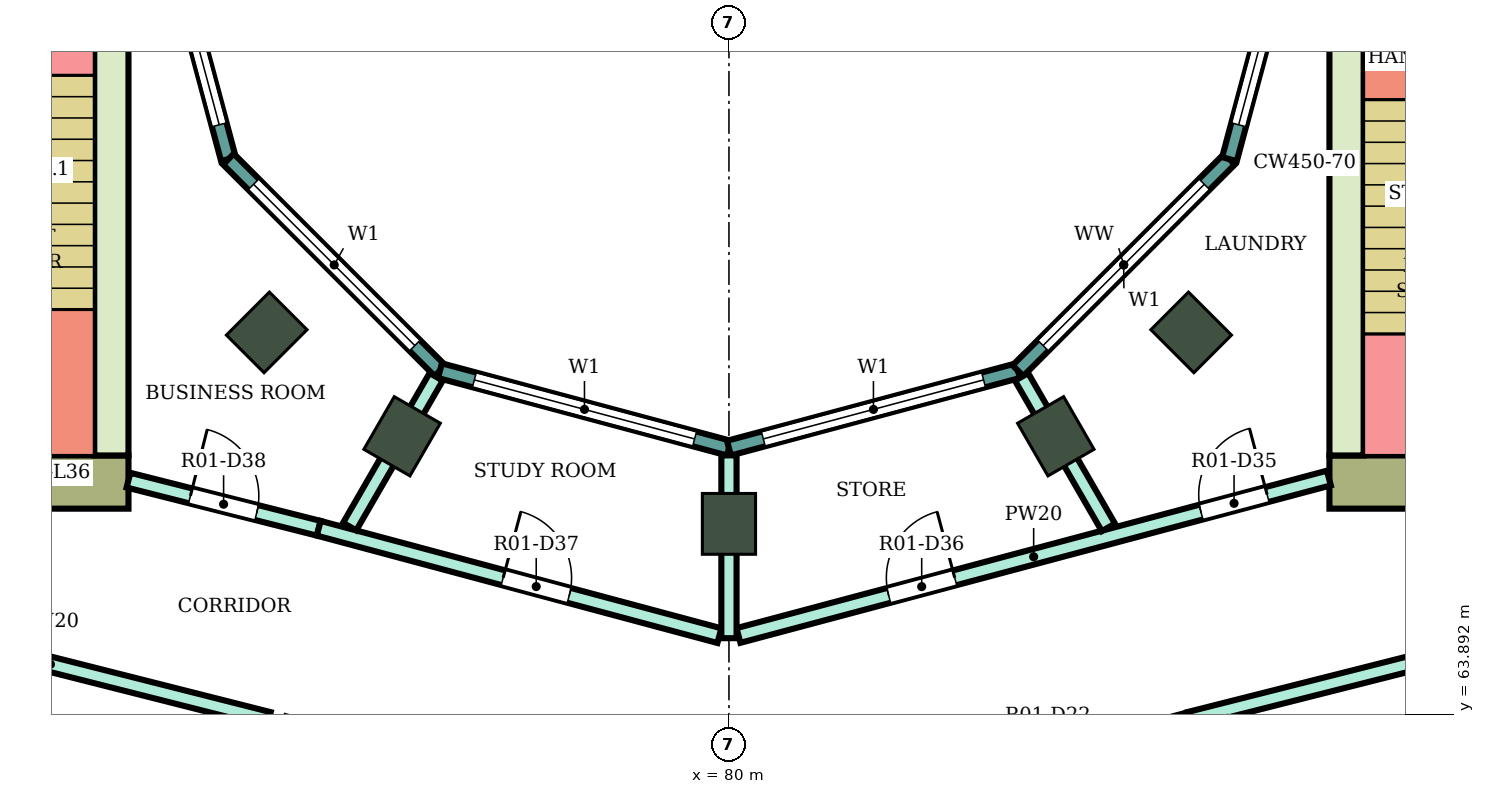
"""IFC4 building model, lengths in metres.
Left out: names, types, materials, properties, quantities, classifications, styles, units other than length and angle.
Written with IfcOpenShell. Run it as: python <this file> out.ifc"""

import sys

from ifc_helpers import new_model, si_unit, direction, frame, frame_2d, origin, origin_2d, place, context, subcontext, project, spatial, rectangle, extrude, element, fill, save


model = new_model("IFC4")
c1 = context("Model", 3, precision=1e-05, world=origin(), true_north=direction((0.0, 1.0)))
c2 = subcontext(c1, "Body", "Model", "MODEL_VIEW")
j1 = project(units=[si_unit("LENGTHUNIT", "METRE"), si_unit("PLANEANGLEUNIT", "RADIAN")], contexts=[c1])
p1 = place(None, origin())
s1 = spatial("IfcSite", under=j1, at=p1, CompositionType="ELEMENT")
p2 = place(p1, origin())
s2 = spatial("IfcBuilding", under=s1, at=p2, CompositionType="ELEMENT")
p3 = place(p2, frame((0.0, 0.0, 157.7)))
s3 = spatial("IfcBuildingStorey", under=s2, at=p3, CompositionType="ELEMENT", Elevation=157.7)
for number, where, z_axis, x_axis in (
    (1, (73.919, 68.919, 0.0), (0.0, 0.0, 1.0), (-0.707, -0.707, 0.0)),
    (2, (75.7, 67.552, 0.0), (0.0, 0.0, 1.0), (-0.5, -0.866, 0.0)),
    (3, (80.0, 66.4, 0.0), (0.0, 0.0, 1.0), (0.0, -1.0, 0.0)),
    (4, (84.3, 67.552, 0.0), (0.0, 0.0, 1.0), (0.5, -0.866, 0.0)),
    (5, (86.081, 68.919, 0.0), (0.0, 0.0, 1.0), (0.707, -0.707, 0.0)),
):
    element("IfcColumn", number, at=place(p3, frame(where, z_axis=z_axis, x_axis=x_axis)), inside=s3, PredefinedType="COLUMN", context=c2, shape_type="SweptSolid", body=[
        extrude(rectangle(XDim=0.8, YDim=0.7, at=origin_2d()), origin(), (0.0, 0.0, 1.0), 4.1),
    ])
p4 = place(p3, frame((87.9, 66.95, 0.0), z_axis=(0.0, 0.0, 1.0), x_axis=(1.0, 0.0, 0.0)))
e6 = element("IfcWall", 6, at=p4, inside=s3, PredefinedType="SHEAR", context=c2, shape_type="SweptSolid", body=[
    extrude(rectangle(XDim=14.8, YDim=0.7, at=frame_2d((7.4, 0.0))), origin(), (0.0, 0.0, 1.0), 3.78),
])
p5 = place(p4, frame((4.2, 0.0, 0.0)))
e7 = element("IfcOpeningElement", 7, at=p5, cuts=e6, PredefinedType="OPENING", context=c2, shape_type="SweptSolid", body=[
    extrude(rectangle(XDim=2.4, YDim=2.4, at=frame_2d((1.2, 1.2))), frame((0.0, 0.36, 0.0), z_axis=(0.0, -1.0, 0.0), x_axis=(1.0, 0.0, 0.0)), (0.0, 0.0, 1.0), 0.72),
])
p6 = place(p3, frame((88.125, 67.3, 0.0), z_axis=(0.0, 0.0, 1.0), x_axis=(0.0, 1.0, 0.0)))
e8 = element("IfcWall", 8, at=p6, inside=s3, PredefinedType="SHEAR", context=c2, shape_type="SweptSolid", body=[
    extrude(rectangle(XDim=7.7, YDim=0.45, at=frame_2d((3.85, 0.0))), origin(), (0.0, 0.0, 1.0), 3.78),
])
p7 = place(p3, frame((72.1, 66.95, 0.0), z_axis=(0.0, 0.0, 1.0), x_axis=(-1.0, 0.0, 0.0)))
e9 = element("IfcWall", 9, at=p7, inside=s3, PredefinedType="SHEAR", context=c2, shape_type="SweptSolid", body=[
    extrude(rectangle(XDim=14.8, YDim=0.7, at=frame_2d((7.4, 0.0))), origin(), (0.0, 0.0, 1.0), 3.78),
])
p8 = place(p7, frame((4.2, 0.0, 0.0)))
e10 = element("IfcOpeningElement", 10, at=p8, cuts=e9, PredefinedType="OPENING", context=c2, shape_type="SweptSolid", body=[
    extrude(rectangle(XDim=2.4, YDim=2.4, at=frame_2d((1.2, 1.2))), frame((0.0, 0.36, 0.0), z_axis=(0.0, -1.0, 0.0), x_axis=(1.0, 0.0, 0.0)), (0.0, 0.0, 1.0), 0.72),
])
p9 = place(p3, frame((71.875, 75.0, 0.0), z_axis=(0.0, 0.0, 1.0), x_axis=(0.0, -1.0, 0.0)))
e11 = element("IfcWall", 11, at=p9, inside=s3, PredefinedType="SHEAR", context=c2, shape_type="SweptSolid", body=[
    extrude(rectangle(XDim=7.7, YDim=0.45, at=frame_2d((3.85, 0.0))), origin(), (0.0, 0.0, 1.0), 3.78),
])
p10 = place(p3, frame((72.396, 75.0, 0.0), z_axis=(0.0, 0.0, 1.0), x_axis=(0.258789828301, -0.965933654434, 0.0)))
e12 = element("IfcWall", 12, at=p10, inside=s3, PredefinedType="NOTDEFINED", context=c2, shape_type="SweptSolid", body=[
    extrude(rectangle(XDim=3.936, YDim=0.2, at=frame_2d((1.968, 0.0))), origin(), (0.0, 0.0, 1.0), 4.1),
])
p11 = place(p10, frame((0.468, 0.0, 0.9)))
e13 = element("IfcOpeningElement", 13, at=p11, cuts=e12, PredefinedType="OPENING", context=c2, shape_type="SweptSolid", body=[
    extrude(rectangle(XDim=3.0, YDim=2.3, at=frame_2d((1.5, 1.15))), frame((0.0, 0.11, 0.0), z_axis=(0.0, -1.0, 0.0), x_axis=(1.0, 0.0, 0.0)), (0.0, 0.0, 1.0), 0.22),
])
p12 = place(p3, frame((73.415, 71.198, 0.0), z_axis=(0.0, 0.0, 1.0), x_axis=(0.707106781187, -0.707106781187, 0.0)))
e14 = element("IfcWall", 14, at=p12, inside=s3, PredefinedType="NOTDEFINED", context=c2, shape_type="SweptSolid", body=[
    extrude(rectangle(XDim=3.936, YDim=0.2, at=frame_2d((1.968, 0.0))), origin(), (0.0, 0.0, 1.0), 4.1),
])
p13 = place(p12, frame((0.468, 0.0, 0.9)))
e15 = element("IfcOpeningElement", 15, at=p13, cuts=e14, PredefinedType="OPENING", context=c2, shape_type="SweptSolid", body=[
    extrude(rectangle(XDim=3.0, YDim=2.3, at=frame_2d((1.5, 1.15))), frame((0.0, 0.11, 0.0), z_axis=(0.0, -1.0, 0.0), x_axis=(1.0, 0.0, 0.0)), (0.0, 0.0, 1.0), 0.22),
])
p14 = place(p3, frame((76.198, 68.415, 0.0), z_axis=(0.0, 0.0, 1.0), x_axis=(0.965933654434, -0.258789828301, 0.0)))
e16 = element("IfcWall", 16, at=p14, inside=s3, PredefinedType="NOTDEFINED", context=c2, shape_type="SweptSolid", body=[
    extrude(rectangle(XDim=3.936, YDim=0.2, at=frame_2d((1.968, 0.0))), origin(), (0.0, 0.0, 1.0), 4.1),
])
p15 = place(p14, frame((0.468, 0.0, 0.9)))
e17 = element("IfcOpeningElement", 17, at=p15, cuts=e16, PredefinedType="OPENING", context=c2, shape_type="SweptSolid", body=[
    extrude(rectangle(XDim=3.0, YDim=2.3, at=frame_2d((1.5, 1.15))), frame((0.0, 0.11, 0.0), z_axis=(0.0, -1.0, 0.0), x_axis=(1.0, 0.0, 0.0)), (0.0, 0.0, 1.0), 0.22),
])
p16 = place(p3, frame((80.0, 67.396, 0.0), z_axis=(0.0, 0.0, 1.0), x_axis=(0.965933654434, 0.258789828301, 0.0)))
e18 = element("IfcWall", 18, at=p16, inside=s3, PredefinedType="NOTDEFINED", context=c2, shape_type="SweptSolid", body=[
    extrude(rectangle(XDim=3.936, YDim=0.2, at=frame_2d((1.968, 0.0))), origin(), (0.0, 0.0, 1.0), 4.1),
])
p17 = place(p16, frame((0.468, 0.0, 0.9)))
e19 = element("IfcOpeningElement", 19, at=p17, cuts=e18, PredefinedType="OPENING", context=c2, shape_type="SweptSolid", body=[
    extrude(rectangle(XDim=3.0, YDim=2.3, at=frame_2d((1.5, 1.15))), frame((0.0, 0.11, 0.0), z_axis=(0.0, -1.0, 0.0), x_axis=(1.0, 0.0, 0.0)), (0.0, 0.0, 1.0), 0.22),
])
p18 = place(p3, frame((83.802, 68.415, 0.0), z_axis=(0.0, 0.0, 1.0), x_axis=(0.707106781187, 0.707106781187, 0.0)))
e20 = element("IfcWall", 20, at=p18, inside=s3, PredefinedType="NOTDEFINED", context=c2, shape_type="SweptSolid", body=[
    extrude(rectangle(XDim=3.936, YDim=0.2, at=frame_2d((1.968, 0.0))), origin(), (0.0, 0.0, 1.0), 4.1),
])
p19 = place(p18, frame((0.468, 0.0, 0.9)))
e21 = element("IfcOpeningElement", 21, at=p19, cuts=e20, PredefinedType="OPENING", context=c2, shape_type="SweptSolid", body=[
    extrude(rectangle(XDim=3.0, YDim=2.3, at=frame_2d((1.5, 1.15))), frame((0.0, 0.11, 0.0), z_axis=(0.0, -1.0, 0.0), x_axis=(1.0, 0.0, 0.0)), (0.0, 0.0, 1.0), 0.22),
])
p20 = place(p3, frame((86.585, 71.198, 0.0), z_axis=(0.0, 0.0, 1.0), x_axis=(0.258789828301, 0.965933654434, 0.0)))
e22 = element("IfcWall", 22, at=p20, inside=s3, PredefinedType="NOTDEFINED", context=c2, shape_type="SweptSolid", body=[
    extrude(rectangle(XDim=3.936, YDim=0.2, at=frame_2d((1.968, 0.0))), origin(), (0.0, 0.0, 1.0), 4.1),
])
p21 = place(p20, frame((0.468, 0.0, 0.9)))
e23 = element("IfcOpeningElement", 23, at=p21, cuts=e22, PredefinedType="OPENING", context=c2, shape_type="SweptSolid", body=[
    extrude(rectangle(XDim=3.0, YDim=2.3, at=frame_2d((1.5, 1.15))), frame((0.0, 0.11, 0.0), z_axis=(0.0, -1.0, 0.0), x_axis=(1.0, 0.0, 0.0)), (0.0, 0.0, 1.0), 0.22),
])
p22 = place(p3, frame((68.2, 65.28, 0.0), z_axis=(0.0, 0.0, 1.0), x_axis=(0.969450596516, -0.245286650503, 0.0)))
e24 = element("IfcWall", 24, at=p22, inside=s3, PredefinedType="PARTITIONING", context=c2, shape_type="SweptSolid", body=[
    extrude(rectangle(XDim=5.928, YDim=0.2, at=frame_2d((2.964, 0.0))), origin(), (0.0, 0.0, 1.0), 3.65),
])
p23 = place(p3, frame((72.1, 66.975, 0.0), z_axis=(0.0, 0.0, 1.0), x_axis=(0.969471314457, -0.245204752086, 0.0)))
e25 = element("IfcWall", 25, at=p23, inside=s3, PredefinedType="PARTITIONING", context=c2, shape_type="SweptSolid", body=[
    extrude(rectangle(XDim=2.582, YDim=0.2, at=frame_2d((1.291, 0.0))), origin(), (0.0, 0.0, 1.0), 3.65),
])
p24 = place(p23, frame((0.841, 0.0, 0.0)))
e26 = element("IfcOpeningElement", 26, at=p24, cuts=e25, PredefinedType="OPENING", context=c2, shape_type="SweptSolid", body=[
    extrude(rectangle(XDim=0.9, YDim=2.1, at=frame_2d((0.45, 1.05))), frame((0.0, 0.11, 0.0), z_axis=(0.0, -1.0, 0.0), x_axis=(1.0, 0.0, 0.0)), (0.0, 0.0, 1.0), 0.22),
])
p25 = place(p3, frame((74.603, 66.342, 0.0), z_axis=(0.0, 0.0, 1.0), x_axis=(0.965920893652, -0.258837453254, 0.0)))
e27 = element("IfcWall", 27, at=p25, inside=s3, PredefinedType="PARTITIONING", context=c2, shape_type="SweptSolid", body=[
    extrude(rectangle(XDim=5.458, YDim=0.2, at=frame_2d((2.729, 0.0))), origin(), (0.0, 0.0, 1.0), 3.65),
])
p26 = place(p25, frame((2.512, 0.0, 0.0)))
e28 = element("IfcOpeningElement", 28, at=p26, cuts=e27, PredefinedType="OPENING", context=c2, shape_type="SweptSolid", body=[
    extrude(rectangle(XDim=0.9, YDim=2.1, at=frame_2d((0.45, 1.05))), frame((0.0, 0.11, 0.0), z_axis=(0.0, -1.0, 0.0), x_axis=(1.0, 0.0, 0.0)), (0.0, 0.0, 1.0), 0.22),
])
p27 = place(p3, frame((75.01, 66.364, 0.0), z_axis=(0.0, 0.0, 1.0), x_axis=(0.50017749597, 0.865922902183, 0.0)))
e29 = element("IfcWall", 29, at=p27, inside=s3, PredefinedType="PARTITIONING", context=c2, shape_type="SweptSolid", body=[
    extrude(rectangle(XDim=2.276, YDim=0.2, at=frame_2d((1.138, 0.0))), origin(), (0.0, 0.0, 1.0), 3.65),
])
p28 = place(p3, frame((80.125, 64.932, 0.0), z_axis=(0.0, 0.0, 1.0), x_axis=(0.966236955806, 0.257655089674, 0.0)))
e30 = element("IfcWall", 30, at=p28, inside=s3, PredefinedType="PARTITIONING", context=c2, shape_type="SweptSolid", body=[
    extrude(rectangle(XDim=8.039, YDim=0.2, at=frame_2d((4.02, 0.0))), origin(), (0.0, 0.0, 1.0), 3.65),
])
p29 = place(p28, frame((6.298, 0.0, 0.0)))
e31 = element("IfcOpeningElement", 31, at=p29, cuts=e30, PredefinedType="OPENING", context=c2, shape_type="SweptSolid", body=[
    extrude(rectangle(XDim=0.9, YDim=2.1, at=frame_2d((0.45, 1.05))), frame((0.0, 0.11, 0.0), z_axis=(0.0, -1.0, 0.0), x_axis=(1.0, 0.0, 0.0)), (0.0, 0.0, 1.0), 0.22),
])
p30 = place(p28, frame((2.045, 0.0, 0.0)))
e32 = element("IfcOpeningElement", 32, at=p30, cuts=e30, PredefinedType="OPENING", context=c2, shape_type="SweptSolid", body=[
    extrude(rectangle(XDim=0.9, YDim=2.1, at=frame_2d((0.45, 1.05))), frame((0.0, 0.11, 0.0), z_axis=(0.0, -1.0, 0.0), x_axis=(1.0, 0.0, 0.0)), (0.0, 0.0, 1.0), 0.22),
])
p31 = place(p3, frame((80.0, 62.205, 0.0), z_axis=(0.0, 0.0, 1.0), x_axis=(0.966104192593, 0.258152453124, 0.0)))
e33 = element("IfcWall", 33, at=p31, inside=s3, PredefinedType="PARTITIONING", context=c2, shape_type="SweptSolid", body=[
    extrude(rectangle(XDim=6.266, YDim=0.2, at=frame_2d((3.133, 0.0))), origin(), (0.0, 0.0, 1.0), 3.65),
])
p32 = place(p31, frame((3.842, 0.0, 0.0)))
e34 = element("IfcOpeningElement", 34, at=p32, cuts=e33, PredefinedType="OPENING", context=c2, shape_type="SweptSolid", body=[
    extrude(rectangle(XDim=1.0, YDim=2.1, at=frame_2d((0.5, 1.05))), frame((0.0, 0.11, 0.0), z_axis=(0.0, -1.0, 0.0), x_axis=(1.0, 0.0, 0.0)), (0.0, 0.0, 1.0), 0.22),
])
p33 = place(p3, frame((80.0, 64.896, 0.0), z_axis=(0.0, 0.0, 1.0), x_axis=(0.0, 1.0, 0.0)))
e35 = element("IfcWall", 35, at=p33, inside=s3, PredefinedType="PARTITIONING", context=c2, shape_type="SweptSolid", body=[
    extrude(rectangle(XDim=2.405, YDim=0.2, at=frame_2d((1.203, 0.0))), origin(), (0.0, 0.0, 1.0), 3.65),
])
p34 = place(p3, frame((83.85, 68.333, 0.0), z_axis=(0.0, 0.0, 1.0), x_axis=(0.499953638813, -0.866052168773, 0.0)))
e36 = element("IfcWall", 36, at=p34, inside=s3, PredefinedType="PARTITIONING", context=c2, shape_type="SweptSolid", body=[
    extrude(rectangle(XDim=2.285, YDim=0.2, at=frame_2d((1.143, 0.0))), origin(), (0.0, 0.0, 1.0), 3.65),
])
p35 = place(p3, frame((86.053, 63.826, 0.0), z_axis=(0.0, 0.0, 1.0), x_axis=(0.969490004987, 0.245130843083, 0.0)))
e37 = element("IfcWall", 37, at=p35, inside=s3, PredefinedType="PARTITIONING", context=c2, shape_type="SweptSolid", body=[
    extrude(rectangle(XDim=5.908, YDim=0.2, at=frame_2d((2.954, 0.0))), origin(), (0.0, 0.0, 1.0), 3.65),
])
p36 = place(p11, origin())
e38 = element("IfcWindow", 38, at=p36, inside=s3, PartitioningType="SINGLE_PANEL", PredefinedType="WINDOW", context=c2, shape_type="SweptSolid", body=[
    extrude(rectangle(XDim=3.0, YDim=2.3, at=frame_2d((1.5, 1.15))), frame((0.0, 0.03, 0.0), z_axis=(0.0, -1.0, 0.0), x_axis=(1.0, 0.0, 0.0)), (0.0, 0.0, 1.0), 0.06),
])
fill(e13, e38)
p37 = place(p13, origin())
e39 = element("IfcWindow", 39, at=p37, inside=s3, PartitioningType="SINGLE_PANEL", PredefinedType="WINDOW", context=c2, shape_type="SweptSolid", body=[
    extrude(rectangle(XDim=3.0, YDim=2.3, at=frame_2d((1.5, 1.15))), frame((0.0, 0.03, 0.0), z_axis=(0.0, -1.0, 0.0), x_axis=(1.0, 0.0, 0.0)), (0.0, 0.0, 1.0), 0.06),
])
fill(e15, e39)
p38 = place(p15, origin())
e40 = element("IfcWindow", 40, at=p38, inside=s3, PartitioningType="SINGLE_PANEL", PredefinedType="WINDOW", context=c2, shape_type="SweptSolid", body=[
    extrude(rectangle(XDim=3.0, YDim=2.3, at=frame_2d((1.5, 1.15))), frame((0.0, 0.03, 0.0), z_axis=(0.0, -1.0, 0.0), x_axis=(1.0, 0.0, 0.0)), (0.0, 0.0, 1.0), 0.06),
])
fill(e17, e40)
p39 = place(p17, origin())
e41 = element("IfcWindow", 41, at=p39, inside=s3, PartitioningType="SINGLE_PANEL", PredefinedType="WINDOW", context=c2, shape_type="SweptSolid", body=[
    extrude(rectangle(XDim=3.0, YDim=2.3, at=frame_2d((1.5, 1.15))), frame((0.0, 0.03, 0.0), z_axis=(0.0, -1.0, 0.0), x_axis=(1.0, 0.0, 0.0)), (0.0, 0.0, 1.0), 0.06),
])
fill(e19, e41)
p40 = place(p19, origin())
e42 = element("IfcWindow", 42, at=p40, inside=s3, PartitioningType="SINGLE_PANEL", PredefinedType="WINDOW", context=c2, shape_type="SweptSolid", body=[
    extrude(rectangle(XDim=3.0, YDim=2.3, at=frame_2d((1.5, 1.15))), frame((0.0, 0.03, 0.0), z_axis=(0.0, -1.0, 0.0), x_axis=(1.0, 0.0, 0.0)), (0.0, 0.0, 1.0), 0.06),
])
fill(e21, e42)
p41 = place(p21, origin())
e43 = element("IfcWindow", 43, at=p41, inside=s3, PartitioningType="SINGLE_PANEL", PredefinedType="WINDOW", context=c2, shape_type="SweptSolid", body=[
    extrude(rectangle(XDim=3.0, YDim=2.3, at=frame_2d((1.5, 1.15))), frame((0.0, 0.03, 0.0), z_axis=(0.0, -1.0, 0.0), x_axis=(1.0, 0.0, 0.0)), (0.0, 0.0, 1.0), 0.06),
])
fill(e23, e43)
p42 = place(p29, origin())
e44 = element("IfcDoor", 44, at=p42, inside=s3, OperationType="SINGLE_SWING_RIGHT", PredefinedType="DOOR", context=c2, shape_type="SweptSolid", body=[
    extrude(rectangle(XDim=0.9, YDim=2.1, at=frame_2d((0.45, 1.05))), frame((0.0, 0.025, 0.0), z_axis=(0.0, -1.0, 0.0), x_axis=(1.0, 0.0, 0.0)), (0.0, 0.0, 1.0), 0.05),
])
fill(e31, e44)
p43 = place(p30, origin())
e45 = element("IfcDoor", 45, at=p43, inside=s3, OperationType="SINGLE_SWING_RIGHT", PredefinedType="DOOR", context=c2, shape_type="SweptSolid", body=[
    extrude(rectangle(XDim=0.9, YDim=2.1, at=frame_2d((0.45, 1.05))), frame((0.0, 0.025, 0.0), z_axis=(0.0, -1.0, 0.0), x_axis=(1.0, 0.0, 0.0)), (0.0, 0.0, 1.0), 0.05),
])
fill(e32, e45)
p44 = place(p26, origin())
e46 = element("IfcDoor", 46, at=p44, inside=s3, OperationType="SINGLE_SWING_LEFT", PredefinedType="DOOR", context=c2, shape_type="SweptSolid", body=[
    extrude(rectangle(XDim=0.9, YDim=2.1, at=frame_2d((0.45, 1.05))), frame((0.0, 0.025, 0.0), z_axis=(0.0, -1.0, 0.0), x_axis=(1.0, 0.0, 0.0)), (0.0, 0.0, 1.0), 0.05),
])
fill(e28, e46)
p45 = place(p24, origin())
e47 = element("IfcDoor", 47, at=p45, inside=s3, OperationType="SINGLE_SWING_LEFT", PredefinedType="DOOR", context=c2, shape_type="SweptSolid", body=[
    extrude(rectangle(XDim=0.9, YDim=2.1, at=frame_2d((0.45, 1.05))), frame((0.0, 0.025, 0.0), z_axis=(0.0, -1.0, 0.0), x_axis=(1.0, 0.0, 0.0)), (0.0, 0.0, 1.0), 0.05),
])
fill(e26, e47)
save(model, sys.argv[1])
